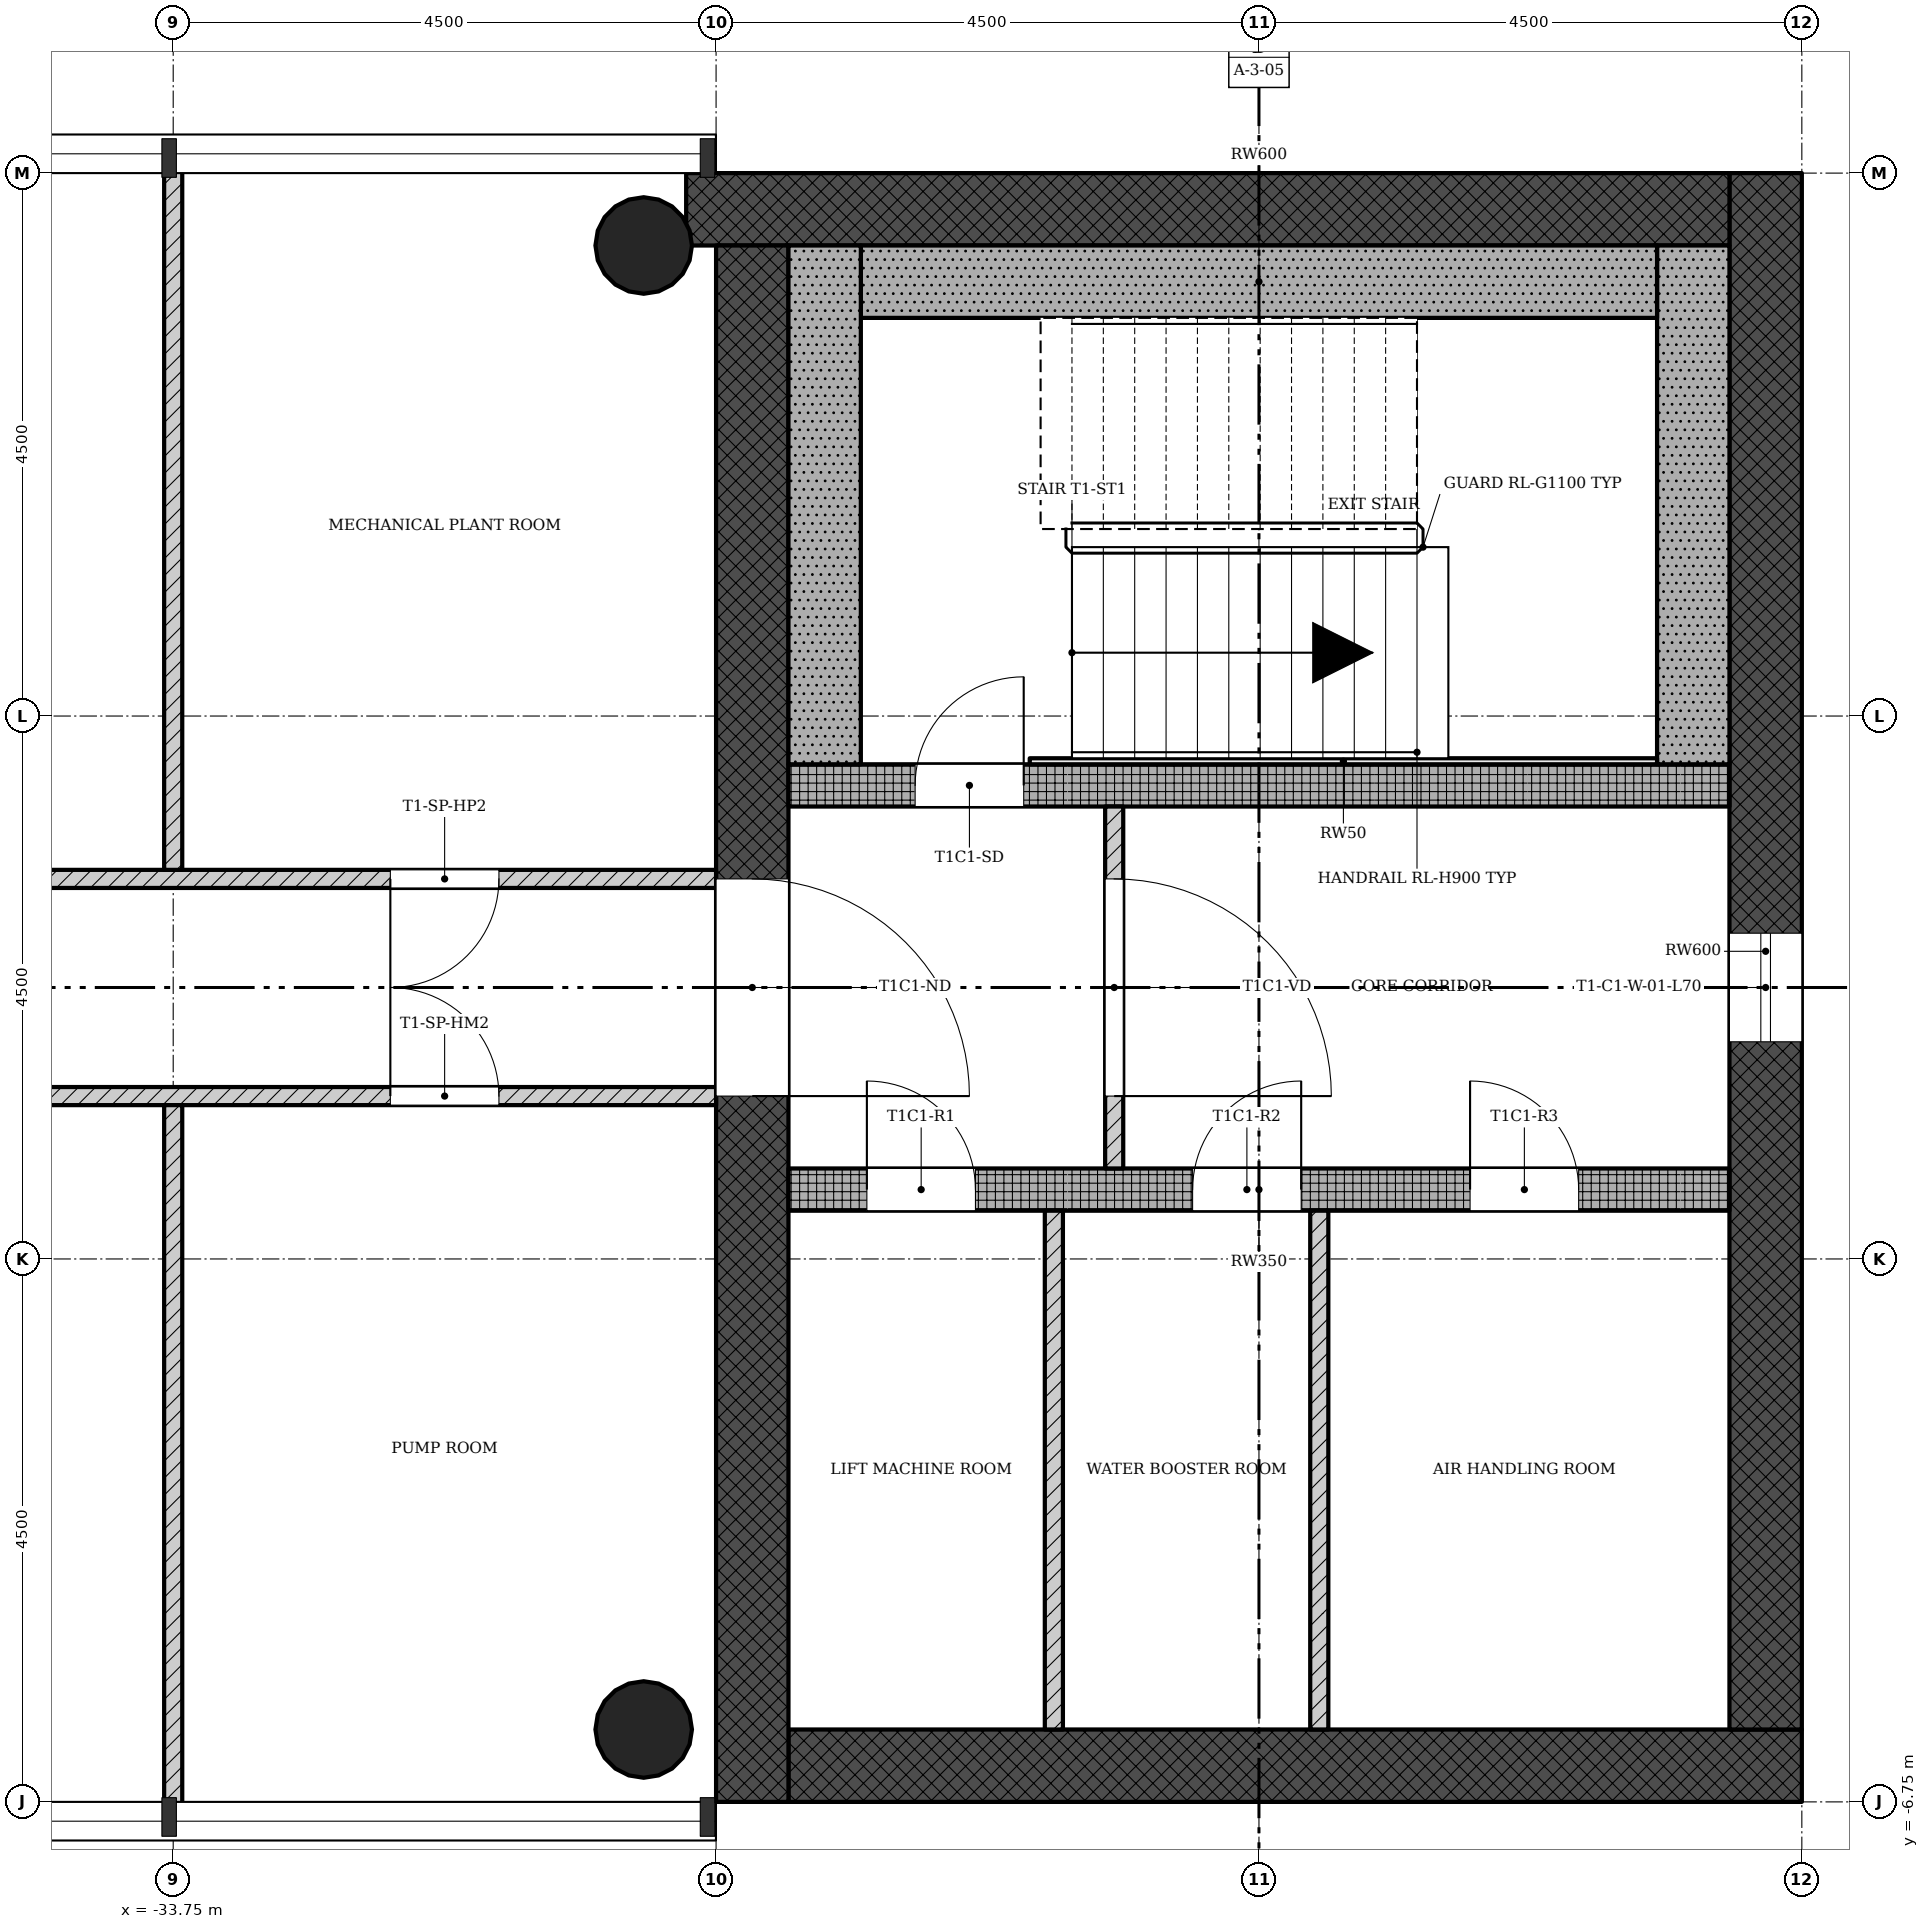
"""IFC4 building model, lengths in metres.
Left out: names, types, materials, properties, quantities, classifications, styles, units other than length and angle.
Written with IfcOpenShell. Run it as: python <this file> out.ifc"""

import sys

from ifc_helpers import new_model, si_unit, direction, frame, frame_2d, origin, origin_2d, place, context, subcontext, project, spatial, rectangle, hollow_circle, extrude, element, fill, save


model = new_model("IFC4")
c1 = context("Model", 3, precision=1e-05, world=origin(), true_north=direction((0.0, 1.0)))
c2 = subcontext(c1, "Body", "Model", "MODEL_VIEW")
j1 = project(units=[si_unit("LENGTHUNIT", "METRE"), si_unit("PLANEANGLEUNIT", "RADIAN")], contexts=[c1])
p1 = place(None, origin())
s1 = spatial("IfcSite", under=j1, at=p1, CompositionType="ELEMENT")
p2 = place(p1, origin())
s2 = spatial("IfcBuilding", under=s1, at=p2, CompositionType="ELEMENT")
p3 = place(p2, frame((0.0, 0.0, 255.9)))
s3 = spatial("IfcBuildingStorey", under=s2, at=p3, CompositionType="ELEMENT", Elevation=255.9)
p4 = place(p3, frame((-28.65, -6.45, 0.0), z_axis=(0.0, 0.0, 1.0), x_axis=(1.0, 0.0, 0.0)))
e1 = element("IfcWall", 1, at=p4, inside=s3, PredefinedType="SHEAR", context=c2, shape_type="SweptSolid", body=[
    extrude(rectangle(XDim=8.4, YDim=0.6, at=frame_2d((4.2, 0.0))), origin(), (0.0, 0.0, 1.0), 4.5),
])
p5 = place(p3, frame((-20.55, -6.15, 0.0), z_axis=(0.0, 0.0, 1.0), x_axis=(0.0, 1.0, 0.0)))
e2 = element("IfcWall", 2, at=p5, inside=s3, PredefinedType="SHEAR", context=c2, shape_type="SweptSolid", body=[
    extrude(rectangle(XDim=12.9, YDim=0.6, at=frame_2d((6.45, 0.0))), origin(), (0.0, 0.0, 1.0), 4.5),
])
p6 = place(p5, frame((5.7, 0.0, 0.45)))
e3 = element("IfcOpeningElement", 3, at=p6, cuts=e2, PredefinedType="OPENING", context=c2, shape_type="SweptSolid", body=[
    extrude(rectangle(XDim=0.9, YDim=2.4, at=frame_2d((0.45, 1.2))), frame((0.0, 0.31, 0.0), z_axis=(0.0, -1.0, 0.0), x_axis=(1.0, 0.0, 0.0)), (0.0, 0.0, 1.0), 0.62),
])
p7 = place(p3, frame((-20.85, 6.45, 0.0), z_axis=(0.0, 0.0, 1.0), x_axis=(-1.0, 0.0, 0.0)))
e4 = element("IfcWall", 4, at=p7, inside=s3, PredefinedType="SHEAR", context=c2, shape_type="SweptSolid", body=[
    extrude(rectangle(XDim=8.648, YDim=0.6, at=frame_2d((4.324, 0.0))), origin(), (0.0, 0.0, 1.0), 4.5),
])
p8 = place(p3, frame((-28.95, 6.15, 0.0), z_axis=(0.0, 0.0, 1.0), x_axis=(0.0, -1.0, 0.0)))
e5 = element("IfcWall", 5, at=p8, inside=s3, PredefinedType="SHEAR", context=c2, shape_type="SweptSolid", body=[
    extrude(rectangle(XDim=12.9, YDim=0.6, at=frame_2d((6.45, 0.0))), origin(), (0.0, 0.0, 1.0), 4.5),
])
p9 = place(p8, frame((5.25, 0.0, 0.0)))
e6 = element("IfcOpeningElement", 6, at=p9, cuts=e5, PredefinedType="OPENING", context=c2, shape_type="SweptSolid", body=[
    extrude(rectangle(XDim=1.8, YDim=2.1, at=frame_2d((0.9, 1.05))), frame((0.0, 0.31, 0.0), z_axis=(0.0, -1.0, 0.0), x_axis=(1.0, 0.0, 0.0)), (0.0, 0.0, 1.0), 0.62),
])
p10 = place(p3, frame((-28.65, -1.675, 0.0), z_axis=(0.0, 0.0, 1.0), x_axis=(1.0, 0.0, 0.0)))
e7 = element("IfcWall", 7, at=p10, inside=s3, PredefinedType="SHEAR", context=c2, shape_type="SweptSolid", body=[
    extrude(rectangle(XDim=7.8, YDim=0.35, at=frame_2d((3.9, 0.0))), origin(), (0.0, 0.0, 1.0), 4.5),
])
p11 = place(p10, frame((0.65, 0.0, 0.0)))
e8 = element("IfcOpeningElement", 8, at=p11, cuts=e7, PredefinedType="OPENING", context=c2, shape_type="SweptSolid", body=[
    extrude(rectangle(XDim=0.9, YDim=2.1, at=frame_2d((0.45, 1.05))), frame((0.0, 0.185, 0.0), z_axis=(0.0, -1.0, 0.0), x_axis=(1.0, 0.0, 0.0)), (0.0, 0.0, 1.0), 0.37),
])
p12 = place(p10, frame((3.35, 0.0, 0.0)))
e9 = element("IfcOpeningElement", 9, at=p12, cuts=e7, PredefinedType="OPENING", context=c2, shape_type="SweptSolid", body=[
    extrude(rectangle(XDim=0.9, YDim=2.1, at=frame_2d((0.45, 1.05))), frame((0.0, 0.185, 0.0), z_axis=(0.0, -1.0, 0.0), x_axis=(1.0, 0.0, 0.0)), (0.0, 0.0, 1.0), 0.37),
])
p13 = place(p10, frame((5.65, 0.0, 0.0)))
e10 = element("IfcOpeningElement", 10, at=p13, cuts=e7, PredefinedType="OPENING", context=c2, shape_type="SweptSolid", body=[
    extrude(rectangle(XDim=0.9, YDim=2.1, at=frame_2d((0.45, 1.05))), frame((0.0, 0.185, 0.0), z_axis=(0.0, -1.0, 0.0), x_axis=(1.0, 0.0, 0.0)), (0.0, 0.0, 1.0), 0.37),
])
p14 = place(p3, frame((-28.65, 1.675, 0.0), z_axis=(0.0, 0.0, 1.0), x_axis=(1.0, 0.0, 0.0)))
e11 = element("IfcWall", 11, at=p14, inside=s3, PredefinedType="SHEAR", context=c2, shape_type="SweptSolid", body=[
    extrude(rectangle(XDim=7.8, YDim=0.35, at=frame_2d((3.9, 0.0))), origin(), (0.0, 0.0, 1.0), 4.5),
])
p15 = place(p14, frame((1.05, 0.0, 0.0)))
e12 = element("IfcOpeningElement", 12, at=p15, cuts=e11, PredefinedType="OPENING", context=c2, shape_type="SweptSolid", body=[
    extrude(rectangle(XDim=0.9, YDim=2.1, at=frame_2d((0.45, 1.05))), frame((0.0, 0.185, 0.0), z_axis=(0.0, -1.0, 0.0), x_axis=(1.0, 0.0, 0.0)), (0.0, 0.0, 1.0), 0.37),
])
for number, where, z_axis, x_axis in (
    (13, (-29.85, -6.15, 0.0), (0.0, 0.0, 1.0), (1.0, 0.0, 0.0)),
    (14, (-29.85, 6.15, 0.0), (0.0, 0.0, 1.0), (1.0, 0.0, 0.0)),
):
    element("IfcColumn", number, at=place(p3, frame(where, z_axis=z_axis, x_axis=x_axis)), inside=s3, PredefinedType="COLUMN", context=c2, shape_type="SweptSolid", body=[
        extrude(hollow_circle(Radius=0.4, WallThickness=0.028, at=origin_2d()), origin(), (0.0, 0.0, 1.0), 4.5),
    ])
p16 = place(p3, frame((-25.95, -1.5, 0.0), z_axis=(0.0, 0.0, 1.0), x_axis=(0.0, 1.0, 0.0)))
e15 = element("IfcWall", 15, at=p16, inside=s3, PredefinedType="PARTITIONING", context=c2, shape_type="SweptSolid", body=[
    extrude(rectangle(XDim=3.0, YDim=0.15, at=frame_2d((1.5, 0.0))), origin(), (0.0, 0.0, 1.0), 4.1),
])
p17 = place(p16, frame((0.6, 0.0, 0.0)))
e16 = element("IfcOpeningElement", 16, at=p17, cuts=e15, PredefinedType="OPENING", context=c2, shape_type="SweptSolid", body=[
    extrude(rectangle(XDim=1.8, YDim=2.1, at=frame_2d((0.9, 1.05))), frame((0.0, 0.085, 0.0), z_axis=(0.0, -1.0, 0.0), x_axis=(1.0, 0.0, 0.0)), (0.0, 0.0, 1.0), 0.17),
])
for number, where, z_axis, x_axis in (
    (17, (-26.45, -6.15, 0.0), (0.0, 0.0, 1.0), (0.0, 1.0, 0.0)),
    (18, (-24.25, -6.15, 0.0), (0.0, 0.0, 1.0), (0.0, 1.0, 0.0)),
):
    element("IfcWall", number, at=place(p3, frame(where, z_axis=z_axis, x_axis=x_axis)), inside=s3, PredefinedType="PARTITIONING", context=c2, shape_type="SweptSolid", body=[
        extrude(rectangle(XDim=4.3, YDim=0.15, at=frame_2d((2.15, 0.0))), origin(), (0.0, 0.0, 1.0), 4.1),
    ])
p18 = place(p3, frame((-42.75, 0.9, 0.0), z_axis=(0.0, 0.0, 1.0), x_axis=(1.0, 0.0, 0.0)))
e19 = element("IfcWall", 19, at=p18, inside=s3, PredefinedType="PARTITIONING", context=c2, shape_type="SweptSolid", body=[
    extrude(rectangle(XDim=13.5, YDim=0.15, at=frame_2d((6.75, 0.0))), origin(), (0.0, 0.0, 1.0), 4.1),
])
p19 = place(p18, frame((4.05, 0.0, 0.0)))
e20 = element("IfcOpeningElement", 20, at=p19, cuts=e19, PredefinedType="OPENING", context=c2, shape_type="SweptSolid", body=[
    extrude(rectangle(XDim=0.9, YDim=2.1, at=frame_2d((0.45, 1.05))), frame((0.0, 0.085, 0.0), z_axis=(0.0, -1.0, 0.0), x_axis=(1.0, 0.0, 0.0)), (0.0, 0.0, 1.0), 0.17),
])
p20 = place(p18, frame((10.8, 0.0, 0.0)))
e21 = element("IfcOpeningElement", 21, at=p20, cuts=e19, PredefinedType="OPENING", context=c2, shape_type="SweptSolid", body=[
    extrude(rectangle(XDim=0.9, YDim=2.1, at=frame_2d((0.45, 1.05))), frame((0.0, 0.085, 0.0), z_axis=(0.0, -1.0, 0.0), x_axis=(1.0, 0.0, 0.0)), (0.0, 0.0, 1.0), 0.17),
])
p21 = place(p3, frame((-33.75, 0.975, 0.0), z_axis=(0.0, 0.0, 1.0), x_axis=(0.0, 1.0, 0.0)))
e22 = element("IfcWall", 22, at=p21, inside=s3, PredefinedType="PARTITIONING", context=c2, shape_type="SweptSolid", body=[
    extrude(rectangle(XDim=5.875, YDim=0.15, at=frame_2d((2.938, 0.0))), origin(), (0.0, 0.0, 1.0), 4.1),
])
p22 = place(p3, frame((-42.75, -0.9, 0.0), z_axis=(0.0, 0.0, 1.0), x_axis=(1.0, 0.0, 0.0)))
e23 = element("IfcWall", 23, at=p22, inside=s3, PredefinedType="PARTITIONING", context=c2, shape_type="SweptSolid", body=[
    extrude(rectangle(XDim=13.5, YDim=0.15, at=frame_2d((6.75, 0.0))), origin(), (0.0, 0.0, 1.0), 4.1),
])
p23 = place(p22, frame((4.05, 0.0, 0.0)))
e24 = element("IfcOpeningElement", 24, at=p23, cuts=e23, PredefinedType="OPENING", context=c2, shape_type="SweptSolid", body=[
    extrude(rectangle(XDim=0.9, YDim=2.1, at=frame_2d((0.45, 1.05))), frame((0.0, 0.085, 0.0), z_axis=(0.0, -1.0, 0.0), x_axis=(1.0, 0.0, 0.0)), (0.0, 0.0, 1.0), 0.17),
])
p24 = place(p22, frame((10.8, 0.0, 0.0)))
e25 = element("IfcOpeningElement", 25, at=p24, cuts=e23, PredefinedType="OPENING", context=c2, shape_type="SweptSolid", body=[
    extrude(rectangle(XDim=0.9, YDim=2.1, at=frame_2d((0.45, 1.05))), frame((0.0, 0.085, 0.0), z_axis=(0.0, -1.0, 0.0), x_axis=(1.0, 0.0, 0.0)), (0.0, 0.0, 1.0), 0.17),
])
p25 = place(p3, frame((-33.75, -0.975, 0.0), z_axis=(0.0, 0.0, 1.0), x_axis=(0.0, -1.0, 0.0)))
e26 = element("IfcWall", 26, at=p25, inside=s3, PredefinedType="PARTITIONING", context=c2, shape_type="SweptSolid", body=[
    extrude(rectangle(XDim=5.875, YDim=0.15, at=frame_2d((2.938, 0.0))), origin(), (0.0, 0.0, 1.0), 4.1),
])
p26 = place(p3, frame((-21.15, 1.85, 0.0), z_axis=(0.0, 0.0, 1.0), x_axis=(0.0, 1.0, 0.0)))
e27 = element("IfcWall", 27, at=p26, inside=s3, PredefinedType="SHEAR", context=c2, shape_type="SweptSolid", body=[
    extrude(rectangle(XDim=4.3, YDim=0.6, at=frame_2d((2.15, 0.0))), origin(), (0.0, 0.0, 1.0), 4.5),
])
p27 = place(p3, frame((-28.05, 5.85, 0.0), z_axis=(0.0, 0.0, 1.0), x_axis=(1.0, 0.0, 0.0)))
e28 = element("IfcWall", 28, at=p27, inside=s3, PredefinedType="SHEAR", context=c2, shape_type="SweptSolid", body=[
    extrude(rectangle(XDim=6.6, YDim=0.6, at=frame_2d((3.3, 0.0))), origin(), (0.0, 0.0, 1.0), 4.5),
])
p28 = place(p3, frame((-28.35, 1.85, 0.0), z_axis=(0.0, 0.0, 1.0), x_axis=(0.0, 1.0, 0.0)))
e29 = element("IfcWall", 29, at=p28, inside=s3, PredefinedType="SHEAR", context=c2, shape_type="SweptSolid", body=[
    extrude(rectangle(XDim=4.3, YDim=0.6, at=frame_2d((2.15, 0.0))), origin(), (0.0, 0.0, 1.0), 4.5),
])
p29 = place(p3, frame((-26.65, 1.875, 0.0), z_axis=(0.0, 0.0, 1.0), x_axis=(1.0, 0.0, 0.0)))
e30 = element("IfcWall", 30, at=p29, inside=s3, PredefinedType="SHEAR", context=c2, shape_type="SweptSolid", body=[
    extrude(rectangle(XDim=5.2, YDim=0.05, at=frame_2d((2.6, 0.0))), origin(), (0.0, 0.0, 1.0), 4.5),
])
p30 = place(p6, origin())
e31 = element("IfcWindow", 31, at=p30, inside=s3, PartitioningType="SINGLE_PANEL", PredefinedType="WINDOW", context=c2, shape_type="SweptSolid", body=[
    extrude(rectangle(XDim=0.9, YDim=2.4, at=frame_2d((0.45, 1.2))), frame((0.0, 0.03, 0.0), z_axis=(0.0, -1.0, 0.0), x_axis=(1.0, 0.0, 0.0)), (0.0, 0.0, 1.0), 0.06),
])
fill(e3, e31)
p31 = place(p17, origin())
e32 = element("IfcDoor", 32, at=p31, inside=s3, OperationType="SINGLE_SWING_LEFT", PredefinedType="DOOR", context=c2, shape_type="SweptSolid", body=[
    extrude(rectangle(XDim=1.8, YDim=2.1, at=frame_2d((0.9, 1.05))), frame((0.0, 0.025, 0.0), z_axis=(0.0, -1.0, 0.0), x_axis=(1.0, 0.0, 0.0)), (0.0, 0.0, 1.0), 0.05),
])
fill(e16, e32)
p32 = place(p20, origin())
e33 = element("IfcDoor", 33, at=p32, inside=s3, OperationType="SINGLE_SWING_LEFT", PredefinedType="DOOR", context=c2, shape_type="SweptSolid", body=[
    extrude(rectangle(XDim=0.9, YDim=2.1, at=frame_2d((0.45, 1.05))), frame((0.0, 0.025, 0.0), z_axis=(0.0, -1.0, 0.0), x_axis=(1.0, 0.0, 0.0)), (0.0, 0.0, 1.0), 0.05),
])
fill(e21, e33)
p33 = place(p24, origin())
e34 = element("IfcDoor", 34, at=p33, inside=s3, OperationType="SINGLE_SWING_RIGHT", PredefinedType="DOOR", context=c2, shape_type="SweptSolid", body=[
    extrude(rectangle(XDim=0.9, YDim=2.1, at=frame_2d((0.45, 1.05))), frame((0.0, 0.025, 0.0), z_axis=(0.0, -1.0, 0.0), x_axis=(1.0, 0.0, 0.0)), (0.0, 0.0, 1.0), 0.05),
])
fill(e25, e34)
p34 = place(p15, origin())
e35 = element("IfcDoor", 35, at=p34, inside=s3, OperationType="SINGLE_SWING_LEFT", PredefinedType="DOOR", context=c2, shape_type="SweptSolid", body=[
    extrude(rectangle(XDim=0.9, YDim=2.1, at=frame_2d((0.45, 1.05))), frame((0.0, 0.025, 0.0), z_axis=(0.0, -1.0, 0.0), x_axis=(1.0, 0.0, 0.0)), (0.0, 0.0, 1.0), 0.05),
])
fill(e12, e35)
p35 = place(p11, origin())
e36 = element("IfcDoor", 36, at=p35, inside=s3, OperationType="SINGLE_SWING_RIGHT", PredefinedType="DOOR", context=c2, shape_type="SweptSolid", body=[
    extrude(rectangle(XDim=0.9, YDim=2.1, at=frame_2d((0.45, 1.05))), frame((0.0, 0.025, 0.0), z_axis=(0.0, -1.0, 0.0), x_axis=(1.0, 0.0, 0.0)), (0.0, 0.0, 1.0), 0.05),
])
fill(e8, e36)
p36 = place(p12, origin())
e37 = element("IfcDoor", 37, at=p36, inside=s3, OperationType="SINGLE_SWING_LEFT", PredefinedType="DOOR", context=c2, shape_type="SweptSolid", body=[
    extrude(rectangle(XDim=0.9, YDim=2.1, at=frame_2d((0.45, 1.05))), frame((0.0, 0.025, 0.0), z_axis=(0.0, -1.0, 0.0), x_axis=(1.0, 0.0, 0.0)), (0.0, 0.0, 1.0), 0.05),
])
fill(e9, e37)
p37 = place(p13, origin())
e38 = element("IfcDoor", 38, at=p37, inside=s3, OperationType="SINGLE_SWING_RIGHT", PredefinedType="DOOR", context=c2, shape_type="SweptSolid", body=[
    extrude(rectangle(XDim=0.9, YDim=2.1, at=frame_2d((0.45, 1.05))), frame((0.0, 0.025, 0.0), z_axis=(0.0, -1.0, 0.0), x_axis=(1.0, 0.0, 0.0)), (0.0, 0.0, 1.0), 0.05),
])
fill(e10, e38)
p38 = place(p9, origin())
e39 = element("IfcDoor", 39, at=p38, inside=s3, OperationType="SINGLE_SWING_LEFT", PredefinedType="DOOR", context=c2, shape_type="SweptSolid", body=[
    extrude(rectangle(XDim=1.8, YDim=2.1, at=frame_2d((0.9, 1.05))), frame((0.0, 0.025, 0.0), z_axis=(0.0, -1.0, 0.0), x_axis=(1.0, 0.0, 0.0)), (0.0, 0.0, 1.0), 0.05),
])
fill(e6, e39)
save(model, sys.argv[1])
